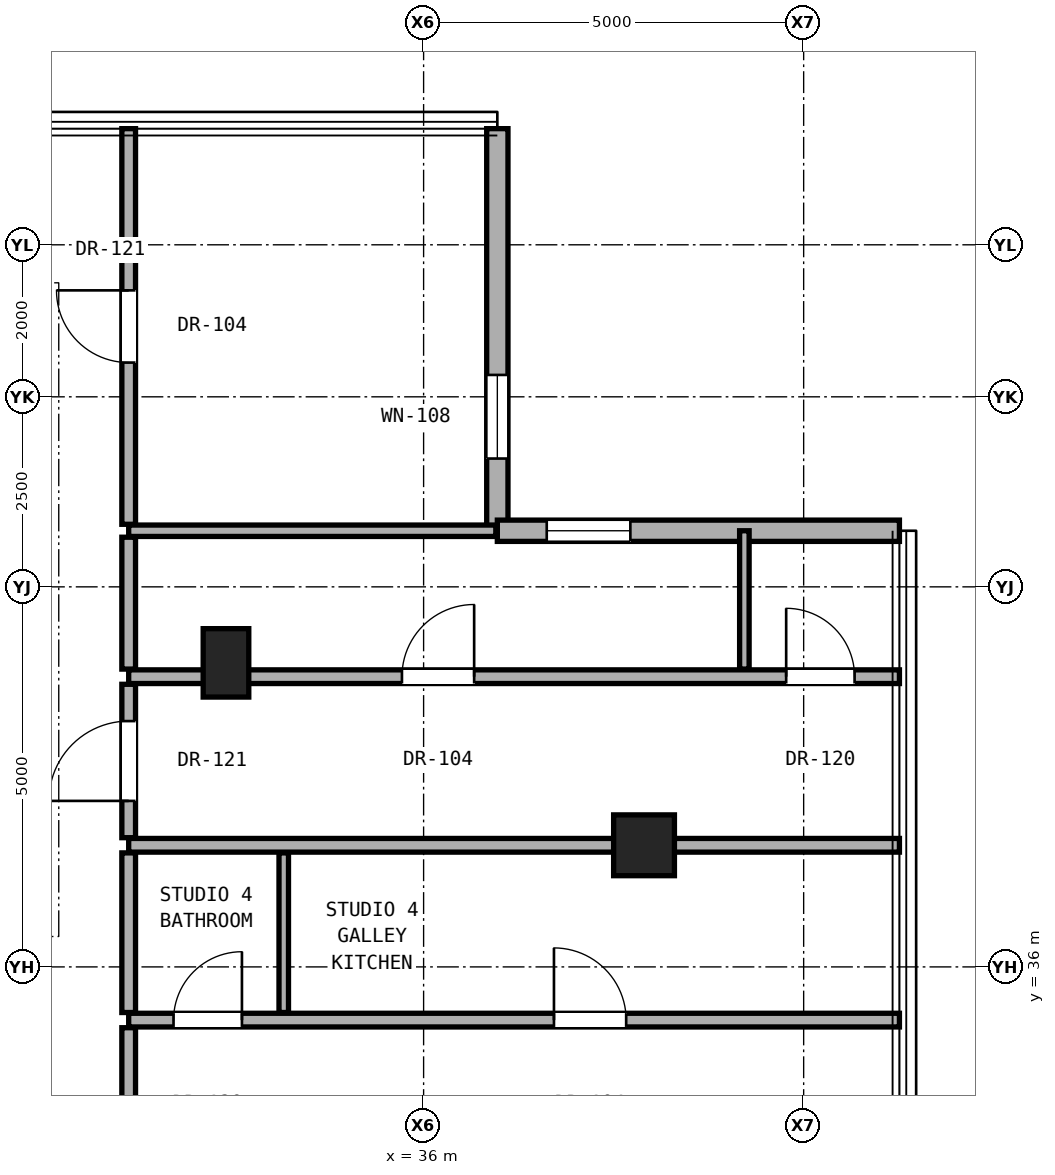
"""IFC4 building model, lengths in metres.
Left out: names, types, materials, properties, quantities, classifications, styles, units other than length and angle.
Written with IfcOpenShell. Run it as: python <this file> out.ifc"""

import sys

from ifc_helpers import new_model, si_unit, direction, frame, frame_2d, origin, origin_2d, place, context, subcontext, project, spatial, rectangle, hollow_rectangle, extrude, element, fill, save


model = new_model("IFC4")
c1 = context("Model", 3, precision=1e-05, world=origin(), true_north=direction((0.0, 1.0)))
c2 = subcontext(c1, "Body", "Model", "MODEL_VIEW")
j1 = project(units=[si_unit("LENGTHUNIT", "METRE"), si_unit("PLANEANGLEUNIT", "RADIAN")], contexts=[c1])
p1 = place(None, origin())
s1 = spatial("IfcSite", under=j1, at=p1, CompositionType="ELEMENT")
p2 = place(p1, origin())
s2 = spatial("IfcBuilding", under=s1, at=p2, CompositionType="ELEMENT")
p3 = place(p2, frame((0.0, 0.0, 239.2)))
s3 = spatial("IfcBuildingStorey", under=s2, at=p3, CompositionType="ELEMENT", Elevation=239.2)
p4 = place(p3, frame((38.9, 37.6, 0.0), z_axis=(0.0, 0.0, 1.0), x_axis=(1.0, 0.0, 0.0)))
e1 = element("IfcColumn", 1, at=p4, inside=s3, PredefinedType="COLUMN", context=c2, shape_type="SweptSolid", body=[
    extrude(hollow_rectangle(XDim=0.8, YDim=0.8, WallThickness=0.045, at=origin_2d()), origin(), (0.0, 0.0, 1.0), 3.3),
])
p5 = place(p3, frame((33.4, 40.0, 0.0), z_axis=(0.0, 0.0, 1.0), x_axis=(1.0, 0.0, 0.0)))
e2 = element("IfcColumn", 2, at=p5, inside=s3, PredefinedType="PILASTER", context=c2, shape_type="SweptSolid", body=[
    extrude(rectangle(XDim=0.6, YDim=0.9, at=origin_2d()), origin(), (0.0, 0.0, 1.0), 3.3),
])
p6 = place(p3, frame((36.97, 41.738, 0.0), z_axis=(0.0, 0.0, 1.0), x_axis=(0.0, 1.0, 0.0)))
e3 = element("IfcWall", 3, at=p6, inside=s3, PredefinedType="SOLIDWALL", context=c2, shape_type="SweptSolid", body=[
    extrude(rectangle(XDim=5.29, YDim=0.28, at=frame_2d((2.645, 0.0))), origin(), (0.0, 0.0, 1.0), 3.08),
])
p7 = place(p6, frame((0.95, 0.0, 0.85)))
e4 = element("IfcOpeningElement", 4, at=p7, cuts=e3, PredefinedType="OPENING", context=c2, shape_type="SweptSolid", body=[
    extrude(rectangle(XDim=1.1, YDim=2.0, at=frame_2d((0.55, 1.0))), frame((0.0, 0.15, 0.0), z_axis=(0.0, -1.0, 0.0), x_axis=(1.0, 0.0, 0.0)), (0.0, 0.0, 1.0), 0.3),
])
p8 = place(p3, frame((42.26, 41.738, 0.0), z_axis=(0.0, 0.0, 1.0), x_axis=(-1.0, 0.0, 0.0)))
e5 = element("IfcWall", 5, at=p8, inside=s3, PredefinedType="SOLIDWALL", context=c2, shape_type="SweptSolid", body=[
    extrude(rectangle(XDim=5.29, YDim=0.28, at=frame_2d((2.645, 0.0))), origin(), (0.0, 0.0, 1.0), 3.08),
])
p9 = place(p8, frame((3.54, 0.0, 0.85)))
e6 = element("IfcOpeningElement", 6, at=p9, cuts=e5, PredefinedType="OPENING", context=c2, shape_type="SweptSolid", body=[
    extrude(rectangle(XDim=1.1, YDim=2.0, at=frame_2d((0.55, 1.0))), frame((0.0, 0.15, 0.0), z_axis=(0.0, -1.0, 0.0), x_axis=(1.0, 0.0, 0.0)), (0.0, 0.0, 1.0), 0.3),
])
p10 = place(p3, frame((32.12, 35.3, 0.0), z_axis=(0.0, 0.0, 1.0), x_axis=(1.0, 0.0, 0.0)))
e7 = element("IfcWall", 7, at=p10, inside=s3, PredefinedType="PARTITIONING", context=c2, shape_type="SweptSolid", body=[
    extrude(rectangle(XDim=10.14, YDim=0.18, at=frame_2d((5.07, 0.0))), origin(), (0.0, 0.0, 1.0), 2.319),
])
p11 = place(p10, frame((5.595, 0.0, 0.0)))
e8 = element("IfcOpeningElement", 8, at=p11, cuts=e7, PredefinedType="OPENING", context=c2, shape_type="SweptSolid", body=[
    extrude(rectangle(XDim=0.95, YDim=2.15, at=frame_2d((0.475, 1.075))), frame((0.0, 0.1, 0.0), z_axis=(0.0, -1.0, 0.0), x_axis=(1.0, 0.0, 0.0)), (0.0, 0.0, 1.0), 0.2),
])
p12 = place(p10, frame((0.59, 0.0, 0.0)))
e9 = element("IfcOpeningElement", 9, at=p12, cuts=e7, PredefinedType="OPENING", context=c2, shape_type="SweptSolid", body=[
    extrude(rectangle(XDim=0.9, YDim=2.1, at=frame_2d((0.45, 1.05))), frame((0.0, 0.1, 0.0), z_axis=(0.0, -1.0, 0.0), x_axis=(1.0, 0.0, 0.0)), (0.0, 0.0, 1.0), 0.2),
])
p13 = place(p3, frame((32.12, 37.6, 0.0), z_axis=(0.0, 0.0, 1.0), x_axis=(1.0, 0.0, 0.0)))
e10 = element("IfcWall", 10, at=p13, inside=s3, PredefinedType="PARTITIONING", context=c2, shape_type="SweptSolid", body=[
    extrude(rectangle(XDim=10.14, YDim=0.18, at=frame_2d((5.07, 0.0))), origin(), (0.0, 0.0, 1.0), 2.319),
])
p14 = place(p3, frame((32.12, 39.818, 0.0), z_axis=(0.0, 0.0, 1.0), x_axis=(1.0, 0.0, 0.0)))
e11 = element("IfcWall", 11, at=p14, inside=s3, PredefinedType="PARTITIONING", context=c2, shape_type="SweptSolid", body=[
    extrude(rectangle(XDim=10.14, YDim=0.18, at=frame_2d((5.07, 0.0))), origin(), (0.0, 0.0, 1.0), 2.543),
])
p15 = place(p14, frame((3.595, 0.0, 0.0)))
e12 = element("IfcOpeningElement", 12, at=p15, cuts=e11, PredefinedType="OPENING", context=c2, shape_type="SweptSolid", body=[
    extrude(rectangle(XDim=0.95, YDim=2.15, at=frame_2d((0.475, 1.075))), frame((0.0, 0.1, 0.0), z_axis=(0.0, -1.0, 0.0), x_axis=(1.0, 0.0, 0.0)), (0.0, 0.0, 1.0), 0.2),
])
p16 = place(p14, frame((8.65, 0.0, 0.0)))
e13 = element("IfcOpeningElement", 13, at=p16, cuts=e11, PredefinedType="OPENING", context=c2, shape_type="SweptSolid", body=[
    extrude(rectangle(XDim=0.9, YDim=2.1, at=frame_2d((0.45, 1.05))), frame((0.0, 0.1, 0.0), z_axis=(0.0, -1.0, 0.0), x_axis=(1.0, 0.0, 0.0)), (0.0, 0.0, 1.0), 0.2),
])
p17 = place(p3, frame((32.12, 41.738, 0.0), z_axis=(0.0, 0.0, 1.0), x_axis=(1.0, 0.0, 0.0)))
e14 = element("IfcWall", 14, at=p17, inside=s3, PredefinedType="PARTITIONING", context=c2, shape_type="SweptSolid", body=[
    extrude(rectangle(XDim=4.83, YDim=0.15, at=frame_2d((2.415, 0.0))), origin(), (0.0, 0.0, 1.0), 3.1),
])
p18 = place(p3, frame((32.12, 31.3, 0.0), z_axis=(0.0, 0.0, 1.0), x_axis=(0.0, 1.0, 0.0)))
e15 = element("IfcWall", 15, at=p18, inside=s3, PredefinedType="PARTITIONING", context=c2, shape_type="SweptSolid", body=[
    extrude(rectangle(XDim=3.9, YDim=0.18, at=frame_2d((1.95, 0.0))), origin(), (0.0, 0.0, 1.0), 2.396),
])
p19 = place(p18, frame((1.425, 0.0, 0.0)))
e16 = element("IfcOpeningElement", 16, at=p19, cuts=e15, PredefinedType="OPENING", context=c2, shape_type="SweptSolid", body=[
    extrude(rectangle(XDim=1.05, YDim=2.2, at=frame_2d((0.525, 1.1))), frame((0.0, 0.1, 0.0), z_axis=(0.0, -1.0, 0.0), x_axis=(1.0, 0.0, 0.0)), (0.0, 0.0, 1.0), 0.2),
])
p20 = place(p3, frame((32.12, 35.4, 0.0), z_axis=(0.0, 0.0, 1.0), x_axis=(0.0, 1.0, 0.0)))
e17 = element("IfcWall", 17, at=p20, inside=s3, PredefinedType="PARTITIONING", context=c2, shape_type="SweptSolid", body=[
    extrude(rectangle(XDim=2.1, YDim=0.18, at=frame_2d((1.05, 0.0))), origin(), (0.0, 0.0, 1.0), 2.492),
])
p21 = place(p3, frame((32.12, 37.7, 0.0), z_axis=(0.0, 0.0, 1.0), x_axis=(0.0, 1.0, 0.0)))
e18 = element("IfcWall", 18, at=p21, inside=s3, PredefinedType="PARTITIONING", context=c2, shape_type="SweptSolid", body=[
    extrude(rectangle(XDim=2.018, YDim=0.18, at=frame_2d((1.009, 0.0))), origin(), (0.0, 0.0, 1.0), 2.492),
])
p22 = place(p21, frame((0.484, 0.0, 0.0)))
e19 = element("IfcOpeningElement", 19, at=p22, cuts=e18, PredefinedType="OPENING", context=c2, shape_type="SweptSolid", body=[
    extrude(rectangle(XDim=1.05, YDim=2.2, at=frame_2d((0.525, 1.1))), frame((0.0, 0.1, 0.0), z_axis=(0.0, -1.0, 0.0), x_axis=(1.0, 0.0, 0.0)), (0.0, 0.0, 1.0), 0.2),
])
p23 = place(p3, frame((32.12, 39.918, 0.0), z_axis=(0.0, 0.0, 1.0), x_axis=(0.0, 1.0, 0.0)))
e20 = element("IfcWall", 20, at=p23, inside=s3, PredefinedType="PARTITIONING", context=c2, shape_type="SweptSolid", body=[
    extrude(rectangle(XDim=1.735, YDim=0.18, at=frame_2d((0.868, 0.0))), origin(), (0.0, 0.0, 1.0), 3.1),
])
p24 = place(p3, frame((32.12, 41.823, 0.0), z_axis=(0.0, 0.0, 1.0), x_axis=(0.0, 1.0, 0.0)))
e21 = element("IfcWall", 21, at=p24, inside=s3, PredefinedType="PARTITIONING", context=c2, shape_type="SweptSolid", body=[
    extrude(rectangle(XDim=5.205, YDim=0.18, at=frame_2d((2.603, 0.0))), origin(), (0.0, 0.0, 1.0), 3.1),
])
p25 = place(p24, frame((2.127, 0.0, 0.0)))
e22 = element("IfcOpeningElement", 22, at=p25, cuts=e21, PredefinedType="OPENING", context=c2, shape_type="SweptSolid", body=[
    extrude(rectangle(XDim=0.95, YDim=2.15, at=frame_2d((0.475, 1.075))), frame((0.0, 0.1, 0.0), z_axis=(0.0, -1.0, 0.0), x_axis=(1.0, 0.0, 0.0)), (0.0, 0.0, 1.0), 0.2),
])
p26 = place(p3, frame((34.16, 35.4, 0.0), z_axis=(0.0, 0.0, 1.0), x_axis=(0.0, 1.0, 0.0)))
e23 = element("IfcWall", 23, at=p26, inside=s3, PredefinedType="PARTITIONING", context=c2, shape_type="SweptSolid", body=[
    extrude(rectangle(XDim=2.1, YDim=0.125, at=frame_2d((1.05, 0.0))), origin(), (0.0, 0.0, 1.0), 2.492),
])
p27 = place(p3, frame((40.22, 39.918, 0.0), z_axis=(0.0, 0.0, 1.0), x_axis=(0.0, 1.0, 0.0)))
e24 = element("IfcWall", 24, at=p27, inside=s3, PredefinedType="PARTITIONING", context=c2, shape_type="SweptSolid", body=[
    extrude(rectangle(XDim=1.82, YDim=0.125, at=frame_2d((0.91, 0.0))), origin(), (0.0, 0.0, 1.0), 3.1),
])
p28 = place(p7, origin())
e25 = element("IfcWindow", 25, at=p28, inside=s3, PartitioningType="SINGLE_PANEL", PredefinedType="WINDOW", context=c2, shape_type="SweptSolid", body=[
    extrude(rectangle(XDim=1.1, YDim=2.0, at=frame_2d((0.55, 1.0))), frame((0.0, 0.03, 0.0), z_axis=(0.0, -1.0, 0.0), x_axis=(1.0, 0.0, 0.0)), (0.0, 0.0, 1.0), 0.06),
])
fill(e4, e25)
p29 = place(p9, origin())
e26 = element("IfcWindow", 26, at=p29, inside=s3, PartitioningType="SINGLE_PANEL", PredefinedType="WINDOW", context=c2, shape_type="SweptSolid", body=[
    extrude(rectangle(XDim=1.1, YDim=2.0, at=frame_2d((0.55, 1.0))), frame((0.0, 0.03, 0.0), z_axis=(0.0, -1.0, 0.0), x_axis=(1.0, 0.0, 0.0)), (0.0, 0.0, 1.0), 0.06),
])
fill(e6, e26)
p30 = place(p11, origin())
e27 = element("IfcDoor", 27, at=p30, inside=s3, OperationType="SINGLE_SWING_LEFT", PredefinedType="DOOR", context=c2, shape_type="SweptSolid", body=[
    extrude(rectangle(XDim=0.95, YDim=2.15, at=frame_2d((0.475, 1.075))), frame((0.0, 0.025, 0.0), z_axis=(0.0, -1.0, 0.0), x_axis=(1.0, 0.0, 0.0)), (0.0, 0.0, 1.0), 0.05),
])
fill(e8, e27)
p31 = place(p12, origin())
e28 = element("IfcDoor", 28, at=p31, inside=s3, OperationType="SINGLE_SWING_RIGHT", PredefinedType="DOOR", context=c2, shape_type="SweptSolid", body=[
    extrude(rectangle(XDim=0.9, YDim=2.1, at=frame_2d((0.45, 1.05))), frame((0.0, 0.025, 0.0), z_axis=(0.0, -1.0, 0.0), x_axis=(1.0, 0.0, 0.0)), (0.0, 0.0, 1.0), 0.05),
])
fill(e9, e28)
p32 = place(p22, origin())
e29 = element("IfcDoor", 29, at=p32, inside=s3, OperationType="SINGLE_SWING_LEFT", PredefinedType="DOOR", context=c2, shape_type="SweptSolid", body=[
    extrude(rectangle(XDim=1.05, YDim=2.2, at=frame_2d((0.525, 1.1))), frame((0.0, 0.025, 0.0), z_axis=(0.0, -1.0, 0.0), x_axis=(1.0, 0.0, 0.0)), (0.0, 0.0, 1.0), 0.05),
])
fill(e19, e29)
p33 = place(p15, origin())
e30 = element("IfcDoor", 30, at=p33, inside=s3, OperationType="SINGLE_SWING_RIGHT", PredefinedType="DOOR", context=c2, shape_type="SweptSolid", body=[
    extrude(rectangle(XDim=0.95, YDim=2.15, at=frame_2d((0.475, 1.075))), frame((0.0, 0.025, 0.0), z_axis=(0.0, -1.0, 0.0), x_axis=(1.0, 0.0, 0.0)), (0.0, 0.0, 1.0), 0.05),
])
fill(e12, e30)
p34 = place(p16, origin())
e31 = element("IfcDoor", 31, at=p34, inside=s3, OperationType="SINGLE_SWING_LEFT", PredefinedType="DOOR", context=c2, shape_type="SweptSolid", body=[
    extrude(rectangle(XDim=0.9, YDim=2.1, at=frame_2d((0.45, 1.05))), frame((0.0, 0.025, 0.0), z_axis=(0.0, -1.0, 0.0), x_axis=(1.0, 0.0, 0.0)), (0.0, 0.0, 1.0), 0.05),
])
fill(e13, e31)
p35 = place(p25, origin())
e32 = element("IfcDoor", 32, at=p35, inside=s3, OperationType="SINGLE_SWING_RIGHT", PredefinedType="DOOR", context=c2, shape_type="SweptSolid", body=[
    extrude(rectangle(XDim=0.95, YDim=2.15, at=frame_2d((0.475, 1.075))), frame((0.0, 0.025, 0.0), z_axis=(0.0, -1.0, 0.0), x_axis=(1.0, 0.0, 0.0)), (0.0, 0.0, 1.0), 0.05),
])
fill(e22, e32)
save(model, sys.argv[1])
